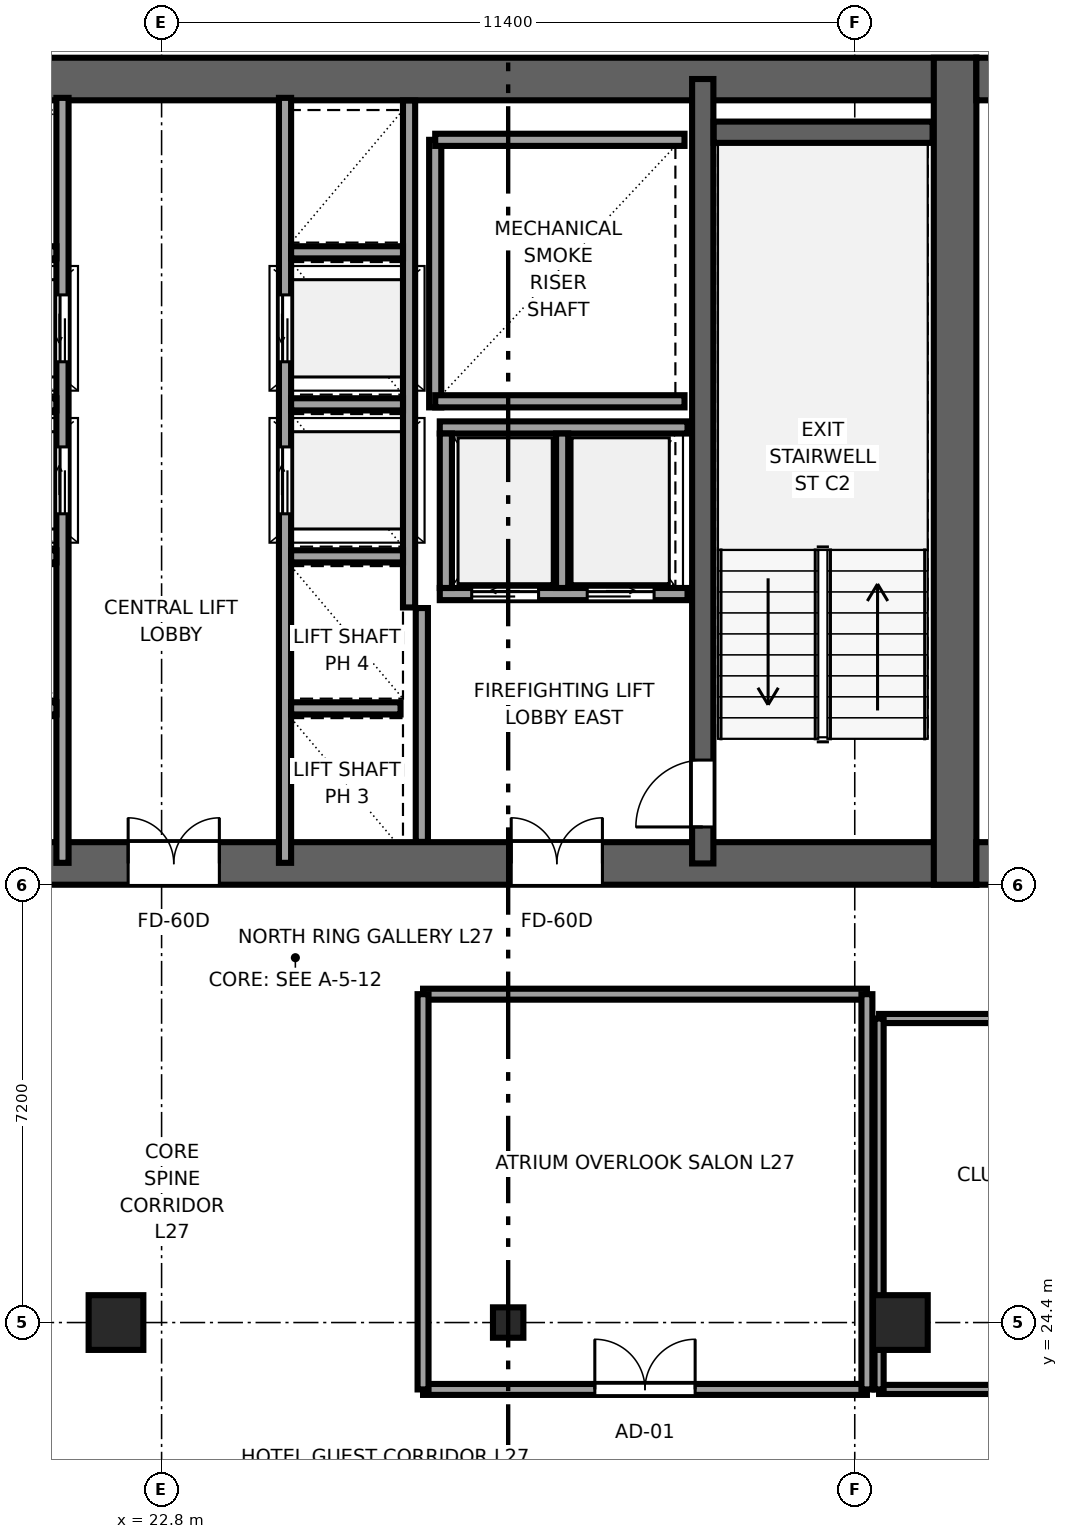
"""IFC4 building model, lengths in metres.
Left out: names, types, materials, properties, quantities, classifications, styles, units other than length and angle.
Written with IfcOpenShell. Run it as: python <this file> out.ifc"""

import sys

from ifc_helpers import new_model, si_unit, direction, frame, frame_2d, origin, origin_2d, place, context, subcontext, project, spatial, rectangle, i_section, extrude, source, transform, mapped, element, fill, save


model = new_model("IFC4")
c1 = context("Model", 3, precision=1e-05, world=origin(), true_north=direction((0.0, 1.0)))
c2 = subcontext(c1, "Body", "Model", "MODEL_VIEW")
j1 = project(units=[si_unit("LENGTHUNIT", "METRE"), si_unit("PLANEANGLEUNIT", "RADIAN")], contexts=[c1])
p1 = place(None, origin())
s1 = spatial("IfcSite", under=j1, at=p1, CompositionType="ELEMENT")
p2 = place(p1, origin())
s2 = spatial("IfcBuilding", under=s1, at=p2, CompositionType="ELEMENT")
p3 = place(p2, frame((0.0, 0.0, 108.0)))
s3 = spatial("IfcBuildingStorey", under=s2, at=p3, CompositionType="ELEMENT", Elevation=108.0)
p4 = place(p3, frame((9.8, 31.95, 0.0), z_axis=(0.0, 0.0, 1.0), x_axis=(1.0, 0.0, 0.0)))
e1 = element("IfcWall", 1, at=p4, inside=s3, PredefinedType="SHEAR", context=c2, shape_type="SweptSolid", body=[
    extrude(rectangle(XDim=26.4, YDim=0.7, at=frame_2d((13.2, 0.0))), origin(), (0.0, 0.0, 1.0), 3.55),
])
p5 = place(p4, frame((7.65, 0.0, 0.0), z_axis=(0.0, 0.0, 1.0), x_axis=(-1.0, 0.0, 0.0)))
e2 = element("IfcOpeningElement", 2, at=p5, cuts=e1, PredefinedType="OPENING", context=c2, shape_type="SweptSolid", body=[
    extrude(rectangle(XDim=1.5, YDim=2.04, at=frame_2d((0.75, 1.02))), frame((0.0, 0.36, 0.0), z_axis=(0.0, -1.0, 0.0), x_axis=(1.0, 0.0, 0.0)), (0.0, 0.0, 1.0), 0.72),
])
p6 = place(p4, frame((13.95, 0.0, 0.0), z_axis=(0.0, 0.0, 1.0), x_axis=(-1.0, 0.0, 0.0)))
e3 = element("IfcOpeningElement", 3, at=p6, cuts=e1, PredefinedType="OPENING", context=c2, shape_type="SweptSolid", body=[
    extrude(rectangle(XDim=1.5, YDim=2.04, at=frame_2d((0.75, 1.02))), frame((0.0, 0.36, 0.0), z_axis=(0.0, -1.0, 0.0), x_axis=(1.0, 0.0, 0.0)), (0.0, 0.0, 1.0), 0.72),
])
p7 = place(p4, frame((20.25, 0.0, 0.0), z_axis=(0.0, 0.0, 1.0), x_axis=(-1.0, 0.0, 0.0)))
e4 = element("IfcOpeningElement", 4, at=p7, cuts=e1, PredefinedType="OPENING", context=c2, shape_type="SweptSolid", body=[
    extrude(rectangle(XDim=1.5, YDim=2.04, at=frame_2d((0.75, 1.02))), frame((0.0, 0.36, 0.0), z_axis=(0.0, -1.0, 0.0), x_axis=(1.0, 0.0, 0.0)), (0.0, 0.0, 1.0), 0.72),
])
p8 = place(p3, frame((9.8, 44.85, 0.0), z_axis=(0.0, 0.0, 1.0), x_axis=(1.0, 0.0, 0.0)))
e5 = element("IfcWall", 5, at=p8, inside=s3, PredefinedType="SHEAR", context=c2, shape_type="SweptSolid", body=[
    extrude(rectangle(XDim=26.4, YDim=0.7, at=frame_2d((13.2, 0.0))), origin(), (0.0, 0.0, 1.0), 3.55),
])
p9 = place(p3, frame((35.85, 31.6, 0.0), z_axis=(0.0, 0.0, 1.0), x_axis=(0.0, 1.0, 0.0)))
e6 = element("IfcWall", 6, at=p9, inside=s3, PredefinedType="SHEAR", context=c2, shape_type="SweptSolid", body=[
    extrude(rectangle(XDim=13.6, YDim=0.7, at=frame_2d((6.8, 0.0))), origin(), (0.0, 0.0, 1.0), 3.55),
])
p10 = place(p3, frame((31.7, 31.95, 0.0), z_axis=(0.0, 0.0, 1.0), x_axis=(0.0, 1.0, 0.0)))
e7 = element("IfcWall", 7, at=p10, inside=s3, PredefinedType="SHEAR", context=c2, shape_type="SweptSolid", body=[
    extrude(rectangle(XDim=12.9, YDim=0.35, at=frame_2d((6.45, 0.0))), origin(), (0.0, 0.0, 1.0), 3.55),
])
p11 = place(p10, frame((1.7, 0.0, 0.0), z_axis=(0.0, 0.0, 1.0), x_axis=(-1.0, 0.0, 0.0)))
e8 = element("IfcOpeningElement", 8, at=p11, cuts=e7, PredefinedType="OPENING", context=c2, shape_type="SweptSolid", body=[
    extrude(rectangle(XDim=1.1, YDim=2.12, at=frame_2d((0.55, 1.06))), frame((0.0, 0.185, 0.0), z_axis=(0.0, -1.0, 0.0), x_axis=(1.0, 0.0, 0.0)), (0.0, 0.0, 1.0), 0.37),
])
p12 = place(p3, frame((36.2, 31.95, 0.0), z_axis=(0.0, 0.0, 1.0), x_axis=(1.0, 0.0, 0.0)))
e9 = element("IfcWall", 9, at=p12, inside=s3, PredefinedType="SHEAR", context=c2, shape_type="SweptSolid", body=[
    extrude(rectangle(XDim=4.2, YDim=0.7, at=frame_2d((2.1, 0.0))), origin(), (0.0, 0.0, 1.0), 3.55),
])
p13 = place(p12, frame((1.34, 0.0, 0.0), z_axis=(0.0, 0.0, 1.0), x_axis=(-1.0, 0.0, 0.0)))
e10 = element("IfcOpeningElement", 10, at=p13, cuts=e9, PredefinedType="OPENING", context=c2, shape_type="SweptSolid", body=[
    extrude(rectangle(XDim=1.02, YDim=2.03, at=frame_2d((0.51, 1.015))), frame((0.0, 0.36, 0.0), z_axis=(0.0, -1.0, 0.0), x_axis=(1.0, 0.0, 0.0)), (0.0, 0.0, 1.0), 0.72),
])
p14 = place(p3, frame((36.2, 44.85, 0.0), z_axis=(0.0, 0.0, 1.0), x_axis=(1.0, 0.0, 0.0)))
e11 = element("IfcWall", 11, at=p14, inside=s3, PredefinedType="SHEAR", context=c2, shape_type="SweptSolid", body=[
    extrude(rectangle(XDim=4.2, YDim=0.7, at=frame_2d((2.1, 0.0))), origin(), (0.0, 0.0, 1.0), 3.55),
])
p15 = place(p3, frame((31.88, 43.975, 0.0), z_axis=(0.0, 0.0, 1.0), x_axis=(1.0, 0.0, 0.0)))
e12 = element("IfcWall", 12, at=p15, inside=s3, PredefinedType="SHEAR", context=c2, shape_type="SweptSolid", body=[
    extrude(rectangle(XDim=3.6, YDim=0.35, at=frame_2d((1.8, 0.0))), origin(), (0.0, 0.0, 1.0), 3.55),
])
m1 = source(origin(), c2, "Body", "SweptSolid", [
    extrude(rectangle(XDim=0.9, YDim=0.9, at=origin_2d()), origin(), (0.0, 0.0, 1.0), 3.55),
])
for number, where, z_axis, x_axis in (
    (13, (22.05, 24.4, 0.0), (0.0, 0.0, 1.0), (1.0, 0.0, 0.0)),
    (14, (34.95, 24.4, 0.0), (0.0, 0.0, 1.0), (1.0, 0.0, 0.0)),
):
    element("IfcColumn", number, at=place(p3, frame(where, z_axis=z_axis, x_axis=x_axis)), inside=s3, PredefinedType="COLUMN", context=c2, shape_type="MappedRepresentation", body=[
        mapped(m1, transform((0.0, 0.0, 0.0), x_axis=(1.0, 0.0, 0.0), y_axis=(0.0, 1.0, 0.0), z_axis=(0.0, 0.0, 1.0), scale=1.0)),
    ])
m2 = source(origin(), c2, "Body", "SweptSolid", [
    extrude(i_section(OverallWidth=0.5, OverallDepth=0.5, WebThickness=0.022, FlangeThickness=0.034, at=origin_2d()), origin(), (0.0, 0.0, 1.0), 3.55),
])
p16 = place(p3, frame((28.5, 24.4, 0.0), z_axis=(0.0, 0.0, 1.0), x_axis=(1.0, 0.0, 0.0)))
e15 = element("IfcColumn", 15, at=p16, inside=s3, PredefinedType="COLUMN", context=c2, shape_type="MappedRepresentation", body=[
    mapped(m2, transform((0.0, 0.0, 0.0), x_axis=(1.0, 0.0, 0.0), y_axis=(0.0, 1.0, 0.0), z_axis=(0.0, 0.0, 1.0), scale=1.0)),
])
p17 = place(p3, frame((27.3, 39.45, 0.0), z_axis=(0.0, 0.0, 1.0), x_axis=(0.0, 1.0, 0.0)))
e16 = element("IfcWall", 16, at=p17, inside=s3, PredefinedType="SOLIDWALL", context=c2, shape_type="SweptSolid", body=[
    extrude(rectangle(XDim=4.4, YDim=0.2, at=frame_2d((2.2, 0.0))), origin(), (0.0, 0.0, 1.0), 3.37),
])
for number, where, z_axis, x_axis in (
    (17, (27.3, 39.55, 0.0), (0.0, 0.0, 1.0), (1.0, 0.0, 0.0)),
    (18, (27.3, 43.85, 0.0), (0.0, 0.0, 1.0), (1.0, 0.0, 0.0)),
):
    element("IfcWall", number, at=place(p3, frame(where, z_axis=z_axis, x_axis=x_axis)), inside=s3, PredefinedType="SOLIDWALL", context=c2, shape_type="SweptSolid", body=[
        extrude(rectangle(XDim=4.1, YDim=0.2, at=frame_2d((2.05, 0.0))), origin(), (0.0, 0.0, 1.0), 3.37),
    ])
p18 = place(p3, frame((27.08, 32.304, 0.0), z_axis=(0.0, 0.0, 1.0), x_axis=(0.0, 1.0, 0.0)))
e19 = element("IfcWall", 19, at=p18, inside=s3, PredefinedType="SOLIDWALL", context=c2, shape_type="SweptSolid", body=[
    extrude(rectangle(XDim=3.846, YDim=0.2, at=frame_2d((1.923, 0.0))), origin(), (0.0, 0.0, 1.0), 3.37),
])
p19 = place(p3, frame((21.17, 31.96, 0.0), z_axis=(0.0, 0.0, 1.0), x_axis=(0.0, 1.0, 0.0)))
e20 = element("IfcWall", 20, at=p19, inside=s3, PredefinedType="SOLIDWALL", context=c2, shape_type="SweptSolid", body=[
    extrude(rectangle(XDim=12.58, YDim=0.2, at=frame_2d((6.29, 0.0))), origin(), (0.0, 0.0, 1.0), 3.37),
])
p20 = place(p19, frame((5.74, 0.0, 0.0)))
e21 = element("IfcOpeningElement", 21, at=p20, cuts=e20, PredefinedType="OPENING", context=c2, shape_type="SweptSolid", body=[
    extrude(rectangle(XDim=1.1, YDim=2.12, at=frame_2d((0.55, 1.06))), frame((0.0, 0.11, 0.0), z_axis=(0.0, -1.0, 0.0), x_axis=(1.0, 0.0, 0.0)), (0.0, 0.0, 1.0), 0.22),
])
p21 = place(p19, frame((8.24, 0.0, 0.0)))
e22 = element("IfcOpeningElement", 22, at=p21, cuts=e20, PredefinedType="OPENING", context=c2, shape_type="SweptSolid", body=[
    extrude(rectangle(XDim=1.1, YDim=2.12, at=frame_2d((0.55, 1.06))), frame((0.0, 0.11, 0.0), z_axis=(0.0, -1.0, 0.0), x_axis=(1.0, 0.0, 0.0)), (0.0, 0.0, 1.0), 0.22),
])
p22 = place(p3, frame((19.27, 34.5, 0.0), z_axis=(0.0, 0.0, 1.0), x_axis=(1.0, 0.0, 0.0)))
e23 = element("IfcWall", 23, at=p22, inside=s3, PredefinedType="SOLIDWALL", context=c2, shape_type="SweptSolid", body=[
    extrude(rectangle(XDim=1.8, YDim=0.2, at=frame_2d((0.9, 0.0))), origin(), (0.0, 0.0, 1.0), 3.37),
])
for number, where, z_axis, x_axis in (
    (24, (19.23, 37.0, 0.0), (0.0, 0.0, 1.0), (1.0, 0.0, 0.0)),
    (25, (19.23, 39.5, 0.0), (0.0, 0.0, 1.0), (1.0, 0.0, 0.0)),
    (26, (19.23, 42.0, 0.0), (0.0, 0.0, 1.0), (1.0, 0.0, 0.0)),
):
    element("IfcWall", number, at=place(p3, frame(where, z_axis=z_axis, x_axis=x_axis)), inside=s3, PredefinedType="SOLIDWALL", context=c2, shape_type="SweptSolid", body=[
        extrude(rectangle(XDim=1.84, YDim=0.2, at=frame_2d((0.92, 0.0))), origin(), (0.0, 0.0, 1.0), 3.37),
    ])
p23 = place(p3, frame((27.375, 36.38, 0.0), z_axis=(0.0, 0.0, 1.0), x_axis=(1.0, 0.0, 0.0)))
e27 = element("IfcWall", 27, at=p23, inside=s3, PredefinedType="SOLIDWALL", context=c2, shape_type="SweptSolid", body=[
    extrude(rectangle(XDim=4.075, YDim=0.2, at=frame_2d((2.038, 0.0))), origin(), (0.0, 0.0, 1.0), 3.37),
])
p24 = place(p23, frame((0.525, 0.0, 0.0)))
e28 = element("IfcOpeningElement", 28, at=p24, cuts=e27, PredefinedType="OPENING", context=c2, shape_type="SweptSolid", body=[
    extrude(rectangle(XDim=1.1, YDim=2.12, at=frame_2d((0.55, 1.06))), frame((0.0, 0.11, 0.0), z_axis=(0.0, -1.0, 0.0), x_axis=(1.0, 0.0, 0.0)), (0.0, 0.0, 1.0), 0.22),
])
p25 = place(p23, frame((2.425, 0.0, 0.0)))
e29 = element("IfcOpeningElement", 29, at=p25, cuts=e27, PredefinedType="OPENING", context=c2, shape_type="SweptSolid", body=[
    extrude(rectangle(XDim=1.1, YDim=2.12, at=frame_2d((0.55, 1.06))), frame((0.0, 0.11, 0.0), z_axis=(0.0, -1.0, 0.0), x_axis=(1.0, 0.0, 0.0)), (0.0, 0.0, 1.0), 0.22),
])
p26 = place(p3, frame((27.375, 39.12, 0.0), z_axis=(0.0, 0.0, 1.0), x_axis=(1.0, 0.0, 0.0)))
e30 = element("IfcWall", 30, at=p26, inside=s3, PredefinedType="SOLIDWALL", context=c2, shape_type="SweptSolid", body=[
    extrude(rectangle(XDim=4.075, YDim=0.2, at=frame_2d((2.038, 0.0))), origin(), (0.0, 0.0, 1.0), 3.37),
])
for number, where, z_axis, x_axis in (
    (31, (27.475, 36.48, 0.0), (0.0, 0.0, 1.0), (0.0, 1.0, 0.0)),
    (32, (29.387, 36.48, 0.0), (0.0, 0.0, 1.0), (0.0, 1.0, 0.0)),
):
    element("IfcWall", number, at=place(p3, frame(where, z_axis=z_axis, x_axis=x_axis)), inside=s3, PredefinedType="SOLIDWALL", context=c2, shape_type="SweptSolid", body=[
        extrude(rectangle(XDim=2.54, YDim=0.2, at=frame_2d((1.27, 0.0))), origin(), (0.0, 0.0, 1.0), 3.37),
    ])
p27 = place(p3, frame((24.83, 31.96, 0.0), z_axis=(0.0, 0.0, 1.0), x_axis=(0.0, 1.0, 0.0)))
e33 = element("IfcWall", 33, at=p27, inside=s3, PredefinedType="SOLIDWALL", context=c2, shape_type="SweptSolid", body=[
    extrude(rectangle(XDim=12.58, YDim=0.2, at=frame_2d((6.29, 0.0))), origin(), (0.0, 0.0, 1.0), 3.37),
])
p28 = place(p27, frame((5.74, 0.0, 0.0)))
e34 = element("IfcOpeningElement", 34, at=p28, cuts=e33, PredefinedType="OPENING", context=c2, shape_type="SweptSolid", body=[
    extrude(rectangle(XDim=1.1, YDim=2.12, at=frame_2d((0.55, 1.06))), frame((0.0, 0.11, 0.0), z_axis=(0.0, -1.0, 0.0), x_axis=(1.0, 0.0, 0.0)), (0.0, 0.0, 1.0), 0.22),
])
p29 = place(p27, frame((8.24, 0.0, 0.0)))
e35 = element("IfcOpeningElement", 35, at=p29, cuts=e33, PredefinedType="OPENING", context=c2, shape_type="SweptSolid", body=[
    extrude(rectangle(XDim=1.1, YDim=2.12, at=frame_2d((0.55, 1.06))), frame((0.0, 0.11, 0.0), z_axis=(0.0, -1.0, 0.0), x_axis=(1.0, 0.0, 0.0)), (0.0, 0.0, 1.0), 0.22),
])
p30 = place(p3, frame((26.87, 36.16, 0.0), z_axis=(0.0, 0.0, 1.0), x_axis=(0.0, 1.0, 0.0)))
e36 = element("IfcWall", 36, at=p30, inside=s3, PredefinedType="SOLIDWALL", context=c2, shape_type="SweptSolid", body=[
    extrude(rectangle(XDim=8.336, YDim=0.2, at=frame_2d((4.168, 0.0))), origin(), (0.0, 0.0, 1.0), 3.37),
])
p31 = place(p3, frame((24.93, 34.5, 0.0), z_axis=(0.0, 0.0, 1.0), x_axis=(1.0, 0.0, 0.0)))
e37 = element("IfcWall", 37, at=p31, inside=s3, PredefinedType="SOLIDWALL", context=c2, shape_type="SweptSolid", body=[
    extrude(rectangle(XDim=1.8, YDim=0.2, at=frame_2d((0.9, 0.0))), origin(), (0.0, 0.0, 1.0), 3.37),
])
for number, where, z_axis, x_axis in (
    (38, (24.93, 37.0, 0.0), (0.0, 0.0, 1.0), (1.0, 0.0, 0.0)),
    (39, (24.93, 39.5, 0.0), (0.0, 0.0, 1.0), (1.0, 0.0, 0.0)),
    (40, (24.93, 42.0, 0.0), (0.0, 0.0, 1.0), (1.0, 0.0, 0.0)),
):
    element("IfcWall", number, at=place(p3, frame(where, z_axis=z_axis, x_axis=x_axis)), inside=s3, PredefinedType="SOLIDWALL", context=c2, shape_type="SweptSolid", body=[
        extrude(rectangle(XDim=1.84, YDim=0.2, at=frame_2d((0.92, 0.0))), origin(), (0.0, 0.0, 1.0), 3.37),
    ])
p32 = place(p3, frame((27.1, 23.3, 0.0), z_axis=(0.0, 0.0, 1.0), x_axis=(1.0, 0.0, 0.0)))
e41 = element("IfcWall", 41, at=p32, inside=s3, PredefinedType="PARTITIONING", context=c2, shape_type="SweptSolid", body=[
    extrude(rectangle(XDim=7.3, YDim=0.18, at=frame_2d((3.65, 0.0))), origin(), (0.0, 0.0, 1.0), 3.37),
])
p33 = place(p32, frame((2.825, 0.0, 0.0)))
e42 = element("IfcOpeningElement", 42, at=p33, cuts=e41, PredefinedType="OPENING", context=c2, shape_type="SweptSolid", body=[
    extrude(rectangle(XDim=1.65, YDim=2.15, at=frame_2d((0.825, 1.075))), frame((0.0, 0.1, 0.0), z_axis=(0.0, -1.0, 0.0), x_axis=(1.0, 0.0, 0.0)), (0.0, 0.0, 1.0), 0.2),
])
p34 = place(p3, frame((27.1, 29.8, 0.0), z_axis=(0.0, 0.0, 1.0), x_axis=(1.0, 0.0, 0.0)))
e43 = element("IfcWall", 43, at=p34, inside=s3, PredefinedType="PARTITIONING", context=c2, shape_type="SweptSolid", body=[
    extrude(rectangle(XDim=7.3, YDim=0.18, at=frame_2d((3.65, 0.0))), origin(), (0.0, 0.0, 1.0), 3.37),
])
for number, where, z_axis, x_axis in (
    (44, (27.1, 23.3, 0.0), (0.0, 0.0, 1.0), (0.0, 1.0, 0.0)),
    (45, (34.4, 23.3, 0.0), (0.0, 0.0, 1.0), (0.0, 1.0, 0.0)),
):
    element("IfcWall", number, at=place(p3, frame(where, z_axis=z_axis, x_axis=x_axis)), inside=s3, PredefinedType="PARTITIONING", context=c2, shape_type="SweptSolid", body=[
        extrude(rectangle(XDim=6.5, YDim=0.18, at=frame_2d((3.25, 0.0))), origin(), (0.0, 0.0, 1.0), 3.37),
    ])
p35 = place(p3, frame((34.6, 23.3, 0.0), z_axis=(0.0, 0.0, 1.0), x_axis=(1.0, 0.0, 0.0)))
e46 = element("IfcWall", 46, at=p35, inside=s3, PredefinedType="PARTITIONING", context=c2, shape_type="SweptSolid", body=[
    extrude(rectangle(XDim=7.5, YDim=0.15, at=frame_2d((3.75, 0.0))), origin(), (0.0, 0.0, 1.0), 3.37),
])
p36 = place(p35, frame((2.925, 0.0, 0.0)))
e47 = element("IfcOpeningElement", 47, at=p36, cuts=e46, PredefinedType="OPENING", context=c2, shape_type="SweptSolid", body=[
    extrude(rectangle(XDim=1.65, YDim=2.15, at=frame_2d((0.825, 1.075))), frame((0.0, 0.085, 0.0), z_axis=(0.0, -1.0, 0.0), x_axis=(1.0, 0.0, 0.0)), (0.0, 0.0, 1.0), 0.17),
])
p37 = place(p3, frame((34.6, 29.4, 0.0), z_axis=(0.0, 0.0, 1.0), x_axis=(1.0, 0.0, 0.0)))
e48 = element("IfcWall", 48, at=p37, inside=s3, PredefinedType="PARTITIONING", context=c2, shape_type="SweptSolid", body=[
    extrude(rectangle(XDim=7.5, YDim=0.15, at=frame_2d((3.75, 0.0))), origin(), (0.0, 0.0, 1.0), 3.37),
])
p38 = place(p3, frame((34.6, 23.3, 0.0), z_axis=(0.0, 0.0, 1.0), x_axis=(0.0, 1.0, 0.0)))
e49 = element("IfcWall", 49, at=p38, inside=s3, PredefinedType="PARTITIONING", context=c2, shape_type="SweptSolid", body=[
    extrude(rectangle(XDim=6.1, YDim=0.15, at=frame_2d((3.05, 0.0))), origin(), (0.0, 0.0, 1.0), 3.37),
])
m3 = source(origin(), c2, "Body", "SweptSolid", [
    extrude(rectangle(XDim=1.1, YDim=2.12, at=frame_2d((0.55, 1.06))), frame((0.0, 0.025, 0.0), z_axis=(0.0, -1.0, 0.0), x_axis=(1.0, 0.0, 0.0)), (0.0, 0.0, 1.0), 0.05),
])
p39 = place(p11, origin())
e50 = element("IfcDoor", 50, at=p39, inside=s3, OperationType="SINGLE_SWING_LEFT", PredefinedType="DOOR", context=c2, shape_type="MappedRepresentation", body=[
    mapped(m3, transform((0.0, 0.0, 0.0), x_axis=(1.0, 0.0, 0.0), y_axis=(0.0, 1.0, 0.0), z_axis=(0.0, 0.0, 1.0), scale=1.0)),
])
fill(e8, e50)
m4 = source(origin(), c2, "Body", "SweptSolid", [
    extrude(rectangle(XDim=1.5, YDim=2.04, at=frame_2d((0.75, 1.02))), frame((0.0, 0.025, 0.0), z_axis=(0.0, -1.0, 0.0), x_axis=(1.0, 0.0, 0.0)), (0.0, 0.0, 1.0), 0.05),
])
p40 = place(p6, origin())
e51 = element("IfcDoor", 51, at=p40, inside=s3, OperationType="DOUBLE_DOOR_SINGLE_SWING", PredefinedType="DOOR", context=c2, shape_type="MappedRepresentation", body=[
    mapped(m4, transform((0.0, 0.0, 0.0), x_axis=(1.0, 0.0, 0.0), y_axis=(0.0, 1.0, 0.0), z_axis=(0.0, 0.0, 1.0), scale=1.0)),
])
fill(e3, e51)
p41 = place(p7, origin())
e52 = element("IfcDoor", 52, at=p41, inside=s3, OperationType="DOUBLE_DOOR_SINGLE_SWING", PredefinedType="DOOR", context=c2, shape_type="MappedRepresentation", body=[
    mapped(m4, transform((0.0, 0.0, 0.0), x_axis=(1.0, 0.0, 0.0), y_axis=(0.0, 1.0, 0.0), z_axis=(0.0, 0.0, 1.0), scale=1.0)),
])
fill(e4, e52)
m5 = source(origin(), c2, "Body", "SweptSolid", [
    extrude(rectangle(XDim=1.1, YDim=2.12, at=frame_2d((0.55, 1.06))), frame((0.0, 0.025, 0.0), z_axis=(0.0, -1.0, 0.0), x_axis=(1.0, 0.0, 0.0)), (0.0, 0.0, 1.0), 0.05),
])
p42 = place(p20, origin())
e53 = element("IfcDoor", 53, at=p42, inside=s3, OperationType="SLIDING_TO_RIGHT", PredefinedType="DOOR", context=c2, shape_type="MappedRepresentation", body=[
    mapped(m5, transform((0.0, 0.0, 0.0), x_axis=(1.0, 0.0, 0.0), y_axis=(0.0, 1.0, 0.0), z_axis=(0.0, 0.0, 1.0), scale=1.0)),
])
fill(e21, e53)
p43 = place(p21, origin())
e54 = element("IfcDoor", 54, at=p43, inside=s3, OperationType="SLIDING_TO_LEFT", PredefinedType="DOOR", context=c2, shape_type="MappedRepresentation", body=[
    mapped(m5, transform((0.0, 0.0, 0.0), x_axis=(1.0, 0.0, 0.0), y_axis=(0.0, 1.0, 0.0), z_axis=(0.0, 0.0, 1.0), scale=1.0)),
])
fill(e22, e54)
p44 = place(p24, origin())
e55 = element("IfcDoor", 55, at=p44, inside=s3, OperationType="SLIDING_TO_LEFT", PredefinedType="DOOR", context=c2, shape_type="MappedRepresentation", body=[
    mapped(m5, transform((0.0, 0.0, 0.0), x_axis=(1.0, 0.0, 0.0), y_axis=(0.0, 1.0, 0.0), z_axis=(0.0, 0.0, 1.0), scale=1.0)),
])
fill(e28, e55)
p45 = place(p25, origin())
e56 = element("IfcDoor", 56, at=p45, inside=s3, OperationType="SLIDING_TO_RIGHT", PredefinedType="DOOR", context=c2, shape_type="MappedRepresentation", body=[
    mapped(m5, transform((0.0, 0.0, 0.0), x_axis=(1.0, 0.0, 0.0), y_axis=(0.0, 1.0, 0.0), z_axis=(0.0, 0.0, 1.0), scale=1.0)),
])
fill(e29, e56)
p46 = place(p28, origin())
e57 = element("IfcDoor", 57, at=p46, inside=s3, OperationType="SLIDING_TO_RIGHT", PredefinedType="DOOR", context=c2, shape_type="MappedRepresentation", body=[
    mapped(m5, transform((0.0, 0.0, 0.0), x_axis=(1.0, 0.0, 0.0), y_axis=(0.0, 1.0, 0.0), z_axis=(0.0, 0.0, 1.0), scale=1.0)),
])
fill(e34, e57)
p47 = place(p29, origin())
e58 = element("IfcDoor", 58, at=p47, inside=s3, OperationType="SLIDING_TO_LEFT", PredefinedType="DOOR", context=c2, shape_type="MappedRepresentation", body=[
    mapped(m5, transform((0.0, 0.0, 0.0), x_axis=(1.0, 0.0, 0.0), y_axis=(0.0, 1.0, 0.0), z_axis=(0.0, 0.0, 1.0), scale=1.0)),
])
fill(e35, e58)
m6 = source(origin(), c2, "Body", "SweptSolid", [
    extrude(rectangle(XDim=1.65, YDim=2.15, at=frame_2d((0.825, 1.075))), frame((0.0, 0.025, 0.0), z_axis=(0.0, -1.0, 0.0), x_axis=(1.0, 0.0, 0.0)), (0.0, 0.0, 1.0), 0.05),
])
p48 = place(p33, origin())
e59 = element("IfcDoor", 59, at=p48, inside=s3, OperationType="DOUBLE_DOOR_SINGLE_SWING", PredefinedType="DOOR", context=c2, shape_type="MappedRepresentation", body=[
    mapped(m6, transform((0.0, 0.0, 0.0), x_axis=(1.0, 0.0, 0.0), y_axis=(0.0, 1.0, 0.0), z_axis=(0.0, 0.0, 1.0), scale=1.0)),
])
fill(e42, e59)
save(model, sys.argv[1])
